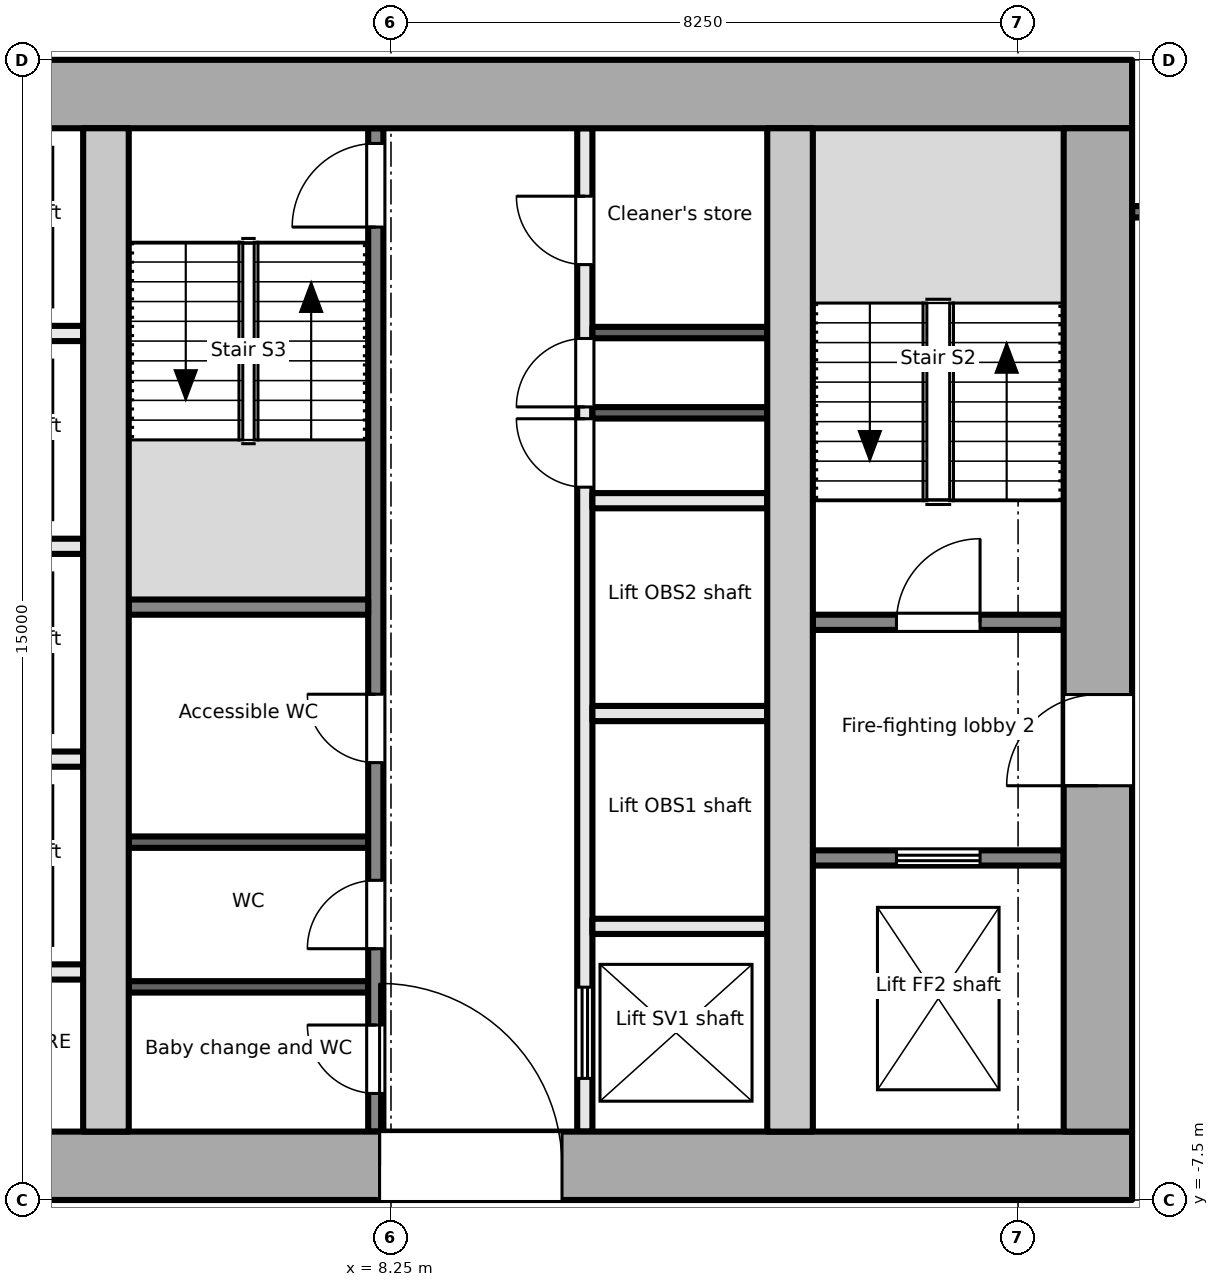
"""IFC4 building model, lengths in metres.
Left out: names, types, materials, properties, quantities, classifications, styles, units other than length and angle.
Written with IfcOpenShell. Run it as: python <this file> out.ifc"""

import sys

from ifc_helpers import new_model, si_unit, direction, frame, frame_2d, origin, place, context, subcontext, project, spatial, rectangle, extrude, element, fill, save


model = new_model("IFC4")
c1 = context("Model", 3, precision=1e-05, world=origin(), true_north=direction((0.0, 1.0)))
c2 = subcontext(c1, "Body", "Model", "MODEL_VIEW")
j1 = project(units=[si_unit("LENGTHUNIT", "METRE"), si_unit("PLANEANGLEUNIT", "RADIAN")], contexts=[c1])
p1 = place(None, origin())
s1 = spatial("IfcSite", under=j1, at=p1, CompositionType="ELEMENT")
p2 = place(p1, origin())
s2 = spatial("IfcBuilding", under=s1, at=p2, CompositionType="ELEMENT")
p3 = place(p2, frame((0.0, 0.0, 259.0)))
s3 = spatial("IfcBuildingStorey", under=s2, at=p3, CompositionType="ELEMENT", Elevation=259.0)
p4 = place(p3, frame((-18.0, -7.05, -0.2), z_axis=(0.0, 0.0, 1.0), x_axis=(1.0, 0.0, 0.0)))
e1 = element("IfcWall", 1, at=p4, inside=s3, PredefinedType="SHEAR", context=c2, shape_type="SweptSolid", body=[
    extrude(rectangle(XDim=36.0, YDim=0.9, at=frame_2d((18.0, 0.0))), origin(), (0.0, 0.0, 1.0), 3.9),
])
p5 = place(p4, frame((8.1, 0.0, 0.2)))
e2 = element("IfcOpeningElement", 2, at=p5, cuts=e1, PredefinedType="OPENING", context=c2, shape_type="SweptSolid", body=[
    extrude(rectangle(XDim=1.8, YDim=2.1, at=frame_2d((0.9, 1.05))), frame((0.0, 0.46, 0.0), z_axis=(0.0, -1.0, 0.0), x_axis=(1.0, 0.0, 0.0)), (0.0, 0.0, 1.0), 0.921),
])
p6 = place(p4, frame((16.8, 0.0, 0.2)))
e3 = element("IfcOpeningElement", 3, at=p6, cuts=e1, PredefinedType="OPENING", context=c2, shape_type="SweptSolid", body=[
    extrude(rectangle(XDim=2.4, YDim=2.1, at=frame_2d((1.2, 1.05))), frame((0.0, 0.46, 0.0), z_axis=(0.0, -1.0, 0.0), x_axis=(1.0, 0.0, 0.0)), (0.0, 0.0, 1.0), 0.921),
])
p7 = place(p4, frame((26.1, 0.0, 0.2)))
e4 = element("IfcOpeningElement", 4, at=p7, cuts=e1, PredefinedType="OPENING", context=c2, shape_type="SweptSolid", body=[
    extrude(rectangle(XDim=2.4, YDim=2.1, at=frame_2d((1.2, 1.05))), frame((0.0, 0.46, 0.0), z_axis=(0.0, -1.0, 0.0), x_axis=(1.0, 0.0, 0.0)), (0.0, 0.0, 1.0), 0.921),
])
p8 = place(p3, frame((-18.0, 7.05, -0.2), z_axis=(0.0, 0.0, 1.0), x_axis=(1.0, 0.0, 0.0)))
e5 = element("IfcWall", 5, at=p8, inside=s3, PredefinedType="SHEAR", context=c2, shape_type="SweptSolid", body=[
    extrude(rectangle(XDim=36.0, YDim=0.9, at=frame_2d((18.0, 0.0))), origin(), (0.0, 0.0, 1.0), 3.9),
])
p9 = place(p3, frame((17.55, -6.6, -0.2), z_axis=(0.0, 0.0, 1.0), x_axis=(0.0, 1.0, 0.0)))
e6 = element("IfcWall", 6, at=p9, inside=s3, PredefinedType="SHEAR", context=c2, shape_type="SweptSolid", body=[
    extrude(rectangle(XDim=13.2, YDim=0.9, at=frame_2d((6.6, 0.0))), origin(), (0.0, 0.0, 1.0), 3.9),
])
p10 = place(p9, frame((4.55, 0.0, 0.2)))
e7 = element("IfcOpeningElement", 7, at=p10, cuts=e6, PredefinedType="OPENING", context=c2, shape_type="SweptSolid", body=[
    extrude(rectangle(XDim=1.2, YDim=2.1, at=frame_2d((0.6, 1.05))), frame((0.0, 0.46, 0.0), z_axis=(0.0, -1.0, 0.0), x_axis=(1.0, 0.0, 0.0)), (0.0, 0.0, 1.0), 0.921),
])
for number, where, z_axis, x_axis in (
    (8, (4.5, -6.6, -0.2), (0.0, 0.0, 1.0), (0.0, 1.0, 0.0)),
    (9, (13.5, -6.6, -0.2), (0.0, 0.0, 1.0), (0.0, 1.0, 0.0)),
):
    element("IfcWall", number, at=place(p3, frame(where, z_axis=z_axis, x_axis=x_axis)), inside=s3, PredefinedType="SHEAR", context=c2, shape_type="SweptSolid", body=[
        extrude(rectangle(XDim=13.2, YDim=0.6, at=frame_2d((6.6, 0.0))), origin(), (0.0, 0.0, 1.0), 3.9),
    ])
p11 = place(p3, frame((13.8, -3.0, 0.0), z_axis=(0.0, 0.0, 1.0), x_axis=(1.0, 0.0, 0.0)))
e10 = element("IfcWall", 10, at=p11, inside=s3, PredefinedType="PARTITIONING", context=c2, shape_type="SweptSolid", body=[
    extrude(rectangle(XDim=3.3, YDim=0.2, at=frame_2d((1.65, 0.0))), origin(), (0.0, 0.0, 1.0), 3.7),
])
p12 = place(p11, frame((1.1, 0.0, 0.0)))
e11 = element("IfcOpeningElement", 11, at=p12, cuts=e10, PredefinedType="OPENING", context=c2, shape_type="SweptSolid", body=[
    extrude(rectangle(XDim=1.1, YDim=2.1, at=frame_2d((0.55, 1.05))), frame((0.0, 0.111, 0.0), z_axis=(0.0, -1.0, 0.0), x_axis=(1.0, 0.0, 0.0)), (0.0, 0.0, 1.0), 0.221),
])
p13 = place(p3, frame((13.8, 0.1, 0.0), z_axis=(0.0, 0.0, 1.0), x_axis=(1.0, 0.0, 0.0)))
e12 = element("IfcWall", 12, at=p13, inside=s3, PredefinedType="PARTITIONING", context=c2, shape_type="SweptSolid", body=[
    extrude(rectangle(XDim=3.3, YDim=0.2, at=frame_2d((1.65, 0.0))), origin(), (0.0, 0.0, 1.0), 3.7),
])
p14 = place(p13, frame((1.1, 0.0, 0.0)))
e13 = element("IfcOpeningElement", 13, at=p14, cuts=e12, PredefinedType="OPENING", context=c2, shape_type="SweptSolid", body=[
    extrude(rectangle(XDim=1.1, YDim=2.1, at=frame_2d((0.55, 1.05))), frame((0.0, 0.111, 0.0), z_axis=(0.0, -1.0, 0.0), x_axis=(1.0, 0.0, 0.0)), (0.0, 0.0, 1.0), 0.221),
])
for number, where, z_axis, x_axis in (
    (14, (1.9, -1.7, 0.0), (0.0, 0.0, 1.0), (1.0, 0.0, 0.0)),
    (15, (1.9, 1.1, 0.0), (0.0, 0.0, 1.0), (1.0, 0.0, 0.0)),
    (16, (1.9, 3.9, 0.0), (0.0, 0.0, 1.0), (1.0, 0.0, 0.0)),
    (17, (1.9, -4.5, 0.0), (0.0, 0.0, 1.0), (1.0, 0.0, 0.0)),
):
    element("IfcWall", number, at=place(p3, frame(where, z_axis=z_axis, x_axis=x_axis)), inside=s3, PredefinedType="PARTITIONING", context=c2, shape_type="SweptSolid", body=[
        extrude(rectangle(XDim=2.3, YDim=0.2, at=frame_2d((1.15, 0.0))), origin(), (0.0, 0.0, 1.0), 3.7),
    ])
p15 = place(p3, frame((8.05, -6.6, 0.0), z_axis=(0.0, 0.0, 1.0), x_axis=(0.0, 1.0, 0.0)))
e18 = element("IfcWall", 18, at=p15, inside=s3, PredefinedType="PARTITIONING", context=c2, shape_type="SweptSolid", body=[
    extrude(rectangle(XDim=13.2, YDim=0.2, at=frame_2d((6.6, 0.0))), origin(), (0.0, 0.0, 1.0), 3.7),
])
p16 = place(p15, frame((0.502, 0.0, 0.0)))
e19 = element("IfcOpeningElement", 19, at=p16, cuts=e18, PredefinedType="OPENING", context=c2, shape_type="SweptSolid", body=[
    extrude(rectangle(XDim=0.9, YDim=2.1, at=frame_2d((0.45, 1.05))), frame((0.0, 0.111, 0.0), z_axis=(0.0, -1.0, 0.0), x_axis=(1.0, 0.0, 0.0)), (0.0, 0.0, 1.0), 0.221),
])
p17 = place(p15, frame((2.406, 0.0, 0.0)))
e20 = element("IfcOpeningElement", 20, at=p17, cuts=e18, PredefinedType="OPENING", context=c2, shape_type="SweptSolid", body=[
    extrude(rectangle(XDim=0.9, YDim=2.1, at=frame_2d((0.45, 1.05))), frame((0.0, 0.111, 0.0), z_axis=(0.0, -1.0, 0.0), x_axis=(1.0, 0.0, 0.0)), (0.0, 0.0, 1.0), 0.221),
])
p18 = place(p15, frame((4.854, 0.0, 0.0)))
e21 = element("IfcOpeningElement", 21, at=p18, cuts=e18, PredefinedType="OPENING", context=c2, shape_type="SweptSolid", body=[
    extrude(rectangle(XDim=0.9, YDim=2.1, at=frame_2d((0.45, 1.05))), frame((0.0, 0.111, 0.0), z_axis=(0.0, -1.0, 0.0), x_axis=(1.0, 0.0, 0.0)), (0.0, 0.0, 1.0), 0.221),
])
p19 = place(p15, frame((11.9, 0.0, 0.0)))
e22 = element("IfcOpeningElement", 22, at=p19, cuts=e18, PredefinedType="OPENING", context=c2, shape_type="SweptSolid", body=[
    extrude(rectangle(XDim=1.1, YDim=2.1, at=frame_2d((0.55, 1.05))), frame((0.0, 0.111, 0.0), z_axis=(0.0, -1.0, 0.0), x_axis=(1.0, 0.0, 0.0)), (0.0, 0.0, 1.0), 0.221),
])
p20 = place(p3, frame((10.8, -6.6, 0.0), z_axis=(0.0, 0.0, 1.0), x_axis=(0.0, 1.0, 0.0)))
e23 = element("IfcWall", 23, at=p20, inside=s3, PredefinedType="PARTITIONING", context=c2, shape_type="SweptSolid", body=[
    extrude(rectangle(XDim=13.2, YDim=0.2, at=frame_2d((6.6, 0.0))), origin(), (0.0, 0.0, 1.0), 3.7),
])
p21 = place(p20, frame((0.7, 0.0, 0.0)))
e24 = element("IfcOpeningElement", 24, at=p21, cuts=e23, PredefinedType="OPENING", context=c2, shape_type="SweptSolid", body=[
    extrude(rectangle(XDim=1.2, YDim=2.1, at=frame_2d((0.6, 1.05))), frame((0.0, 0.111, 0.0), z_axis=(0.0, -1.0, 0.0), x_axis=(1.0, 0.0, 0.0)), (0.0, 0.0, 1.0), 0.221),
])
p22 = place(p20, frame((8.478, 0.0, 0.0)))
e25 = element("IfcOpeningElement", 25, at=p22, cuts=e23, PredefinedType="OPENING", context=c2, shape_type="SweptSolid", body=[
    extrude(rectangle(XDim=0.9, YDim=2.1, at=frame_2d((0.45, 1.05))), frame((0.0, 0.111, 0.0), z_axis=(0.0, -1.0, 0.0), x_axis=(1.0, 0.0, 0.0)), (0.0, 0.0, 1.0), 0.221),
])
p23 = place(p20, frame((9.534, 0.0, 0.0)))
e26 = element("IfcOpeningElement", 26, at=p23, cuts=e23, PredefinedType="OPENING", context=c2, shape_type="SweptSolid", body=[
    extrude(rectangle(XDim=0.9, YDim=2.1, at=frame_2d((0.45, 1.05))), frame((0.0, 0.111, 0.0), z_axis=(0.0, -1.0, 0.0), x_axis=(1.0, 0.0, 0.0)), (0.0, 0.0, 1.0), 0.221),
])
p24 = place(p20, frame((11.406, 0.0, 0.0)))
e27 = element("IfcOpeningElement", 27, at=p24, cuts=e23, PredefinedType="OPENING", context=c2, shape_type="SweptSolid", body=[
    extrude(rectangle(XDim=0.9, YDim=2.1, at=frame_2d((0.45, 1.05))), frame((0.0, 0.111, 0.0), z_axis=(0.0, -1.0, 0.0), x_axis=(1.0, 0.0, 0.0)), (0.0, 0.0, 1.0), 0.221),
])
p25 = place(p3, frame((4.8, 0.3, 0.0), z_axis=(0.0, 0.0, 1.0), x_axis=(1.0, 0.0, 0.0)))
e28 = element("IfcWall", 28, at=p25, inside=s3, PredefinedType="PARTITIONING", context=c2, shape_type="SweptSolid", body=[
    extrude(rectangle(XDim=3.15, YDim=0.2, at=frame_2d((1.575, 0.0))), origin(), (0.0, 0.0, 1.0), 3.7),
])
for number, where, z_axis, x_axis in (
    (29, (4.8, -4.696, 0.0), (0.0, 0.0, 1.0), (1.0, 0.0, 0.0)),
    (30, (4.8, -2.792, 0.0), (0.0, 0.0, 1.0), (1.0, 0.0, 0.0)),
):
    element("IfcWall", number, at=place(p3, frame(where, z_axis=z_axis, x_axis=x_axis)), inside=s3, PredefinedType="PARTITIONING", context=c2, shape_type="SweptSolid", body=[
        extrude(rectangle(XDim=3.15, YDim=0.15, at=frame_2d((1.575, 0.0))), origin(), (0.0, 0.0, 1.0), 3.7),
    ])
for number, where, z_axis, x_axis in (
    (31, (10.9, -3.9, 0.0), (0.0, 0.0, 1.0), (1.0, 0.0, 0.0)),
    (32, (10.9, -1.1, 0.0), (0.0, 0.0, 1.0), (1.0, 0.0, 0.0)),
    (33, (10.9, 1.7, 0.0), (0.0, 0.0, 1.0), (1.0, 0.0, 0.0)),
):
    element("IfcWall", number, at=place(p3, frame(where, z_axis=z_axis, x_axis=x_axis)), inside=s3, PredefinedType="PARTITIONING", context=c2, shape_type="SweptSolid", body=[
        extrude(rectangle(XDim=2.3, YDim=0.2, at=frame_2d((1.15, 0.0))), origin(), (0.0, 0.0, 1.0), 3.7),
    ])
for number, where, z_axis, x_axis in (
    (34, (10.9, 2.856, 0.0), (0.0, 0.0, 1.0), (1.0, 0.0, 0.0)),
    (35, (10.9, 3.912, 0.0), (0.0, 0.0, 1.0), (1.0, 0.0, 0.0)),
):
    element("IfcWall", number, at=place(p3, frame(where, z_axis=z_axis, x_axis=x_axis)), inside=s3, PredefinedType="PARTITIONING", context=c2, shape_type="SweptSolid", body=[
        extrude(rectangle(XDim=2.3, YDim=0.15, at=frame_2d((1.15, 0.0))), origin(), (0.0, 0.0, 1.0), 3.7),
    ])
p26 = place(p3, frame((18.0, 5.501, 0.0), z_axis=(0.0, 0.0, 1.0), x_axis=(1.0, 0.0, 0.0)))
e36 = element("IfcWall", 36, at=p26, inside=s3, PredefinedType="PARTITIONING", context=c2, shape_type="SweptSolid", body=[
    extrude(rectangle(XDim=2.325, YDim=0.15, at=frame_2d((1.163, 0.0))), origin(), (0.0, 0.0, 1.0), 3.7),
])
p27 = place(p12, origin())
e37 = element("IfcDoor", 37, at=p27, inside=s3, OperationType="DOUBLE_DOOR_SLIDING", PredefinedType="DOOR", context=c2, shape_type="SweptSolid", body=[
    extrude(rectangle(XDim=1.1, YDim=2.1, at=frame_2d((0.55, 1.05))), frame((0.0, 0.025, 0.0), z_axis=(0.0, -1.0, 0.0), x_axis=(1.0, 0.0, 0.0)), (0.0, 0.0, 1.0), 0.05),
])
fill(e11, e37)
p28 = place(p10, origin())
e38 = element("IfcDoor", 38, at=p28, inside=s3, OperationType="SINGLE_SWING_LEFT", PredefinedType="DOOR", context=c2, shape_type="SweptSolid", body=[
    extrude(rectangle(XDim=1.2, YDim=2.1, at=frame_2d((0.6, 1.05))), frame((0.0, 0.025, 0.0), z_axis=(0.0, -1.0, 0.0), x_axis=(1.0, 0.0, 0.0)), (0.0, 0.0, 1.0), 0.05),
])
fill(e7, e38)
p29 = place(p14, origin())
e39 = element("IfcDoor", 39, at=p29, inside=s3, OperationType="SINGLE_SWING_RIGHT", PredefinedType="DOOR", context=c2, shape_type="SweptSolid", body=[
    extrude(rectangle(XDim=1.1, YDim=2.1, at=frame_2d((0.55, 1.05))), frame((0.0, 0.025, 0.0), z_axis=(0.0, -1.0, 0.0), x_axis=(1.0, 0.0, 0.0)), (0.0, 0.0, 1.0), 0.05),
])
fill(e13, e39)
p30 = place(p16, origin())
e40 = element("IfcDoor", 40, at=p30, inside=s3, OperationType="SINGLE_SWING_RIGHT", PredefinedType="DOOR", context=c2, shape_type="SweptSolid", body=[
    extrude(rectangle(XDim=0.9, YDim=2.1, at=frame_2d((0.45, 1.05))), frame((0.0, 0.025, 0.0), z_axis=(0.0, -1.0, 0.0), x_axis=(1.0, 0.0, 0.0)), (0.0, 0.0, 1.0), 0.05),
])
fill(e19, e40)
p31 = place(p17, origin())
e41 = element("IfcDoor", 41, at=p31, inside=s3, OperationType="SINGLE_SWING_LEFT", PredefinedType="DOOR", context=c2, shape_type="SweptSolid", body=[
    extrude(rectangle(XDim=0.9, YDim=2.1, at=frame_2d((0.45, 1.05))), frame((0.0, 0.025, 0.0), z_axis=(0.0, -1.0, 0.0), x_axis=(1.0, 0.0, 0.0)), (0.0, 0.0, 1.0), 0.05),
])
fill(e20, e41)
p32 = place(p18, origin())
e42 = element("IfcDoor", 42, at=p32, inside=s3, OperationType="SINGLE_SWING_RIGHT", PredefinedType="DOOR", context=c2, shape_type="SweptSolid", body=[
    extrude(rectangle(XDim=0.9, YDim=2.1, at=frame_2d((0.45, 1.05))), frame((0.0, 0.025, 0.0), z_axis=(0.0, -1.0, 0.0), x_axis=(1.0, 0.0, 0.0)), (0.0, 0.0, 1.0), 0.05),
])
fill(e21, e42)
p33 = place(p19, origin())
e43 = element("IfcDoor", 43, at=p33, inside=s3, OperationType="SINGLE_SWING_LEFT", PredefinedType="DOOR", context=c2, shape_type="SweptSolid", body=[
    extrude(rectangle(XDim=1.1, YDim=2.1, at=frame_2d((0.55, 1.05))), frame((0.0, 0.025, 0.0), z_axis=(0.0, -1.0, 0.0), x_axis=(1.0, 0.0, 0.0)), (0.0, 0.0, 1.0), 0.05),
])
fill(e22, e43)
p34 = place(p7, origin())
e44 = element("IfcDoor", 44, at=p34, inside=s3, OperationType="DOUBLE_DOOR_DOUBLE_SWING", PredefinedType="DOOR", context=c2, shape_type="SweptSolid", body=[
    extrude(rectangle(XDim=2.4, YDim=2.1, at=frame_2d((1.2, 1.05))), frame((0.0, 0.025, 0.0), z_axis=(0.0, -1.0, 0.0), x_axis=(1.0, 0.0, 0.0)), (0.0, 0.0, 1.0), 0.05),
])
fill(e4, e44)
p35 = place(p21, origin())
e45 = element("IfcDoor", 45, at=p35, inside=s3, OperationType="DOUBLE_DOOR_SLIDING", PredefinedType="DOOR", context=c2, shape_type="SweptSolid", body=[
    extrude(rectangle(XDim=1.2, YDim=2.1, at=frame_2d((0.6, 1.05))), frame((0.0, 0.025, 0.0), z_axis=(0.0, -1.0, 0.0), x_axis=(1.0, 0.0, 0.0)), (0.0, 0.0, 1.0), 0.05),
])
fill(e24, e45)
p36 = place(p22, origin())
e46 = element("IfcDoor", 46, at=p36, inside=s3, OperationType="SINGLE_SWING_RIGHT", PredefinedType="DOOR", context=c2, shape_type="SweptSolid", body=[
    extrude(rectangle(XDim=0.9, YDim=2.1, at=frame_2d((0.45, 1.05))), frame((0.0, 0.025, 0.0), z_axis=(0.0, -1.0, 0.0), x_axis=(1.0, 0.0, 0.0)), (0.0, 0.0, 1.0), 0.05),
])
fill(e25, e46)
p37 = place(p23, origin())
e47 = element("IfcDoor", 47, at=p37, inside=s3, OperationType="SINGLE_SWING_LEFT", PredefinedType="DOOR", context=c2, shape_type="SweptSolid", body=[
    extrude(rectangle(XDim=0.9, YDim=2.1, at=frame_2d((0.45, 1.05))), frame((0.0, 0.025, 0.0), z_axis=(0.0, -1.0, 0.0), x_axis=(1.0, 0.0, 0.0)), (0.0, 0.0, 1.0), 0.05),
])
fill(e26, e47)
p38 = place(p24, origin())
e48 = element("IfcDoor", 48, at=p38, inside=s3, OperationType="SINGLE_SWING_RIGHT", PredefinedType="DOOR", context=c2, shape_type="SweptSolid", body=[
    extrude(rectangle(XDim=0.9, YDim=2.1, at=frame_2d((0.45, 1.05))), frame((0.0, 0.025, 0.0), z_axis=(0.0, -1.0, 0.0), x_axis=(1.0, 0.0, 0.0)), (0.0, 0.0, 1.0), 0.05),
])
fill(e27, e48)
save(model, sys.argv[1])
